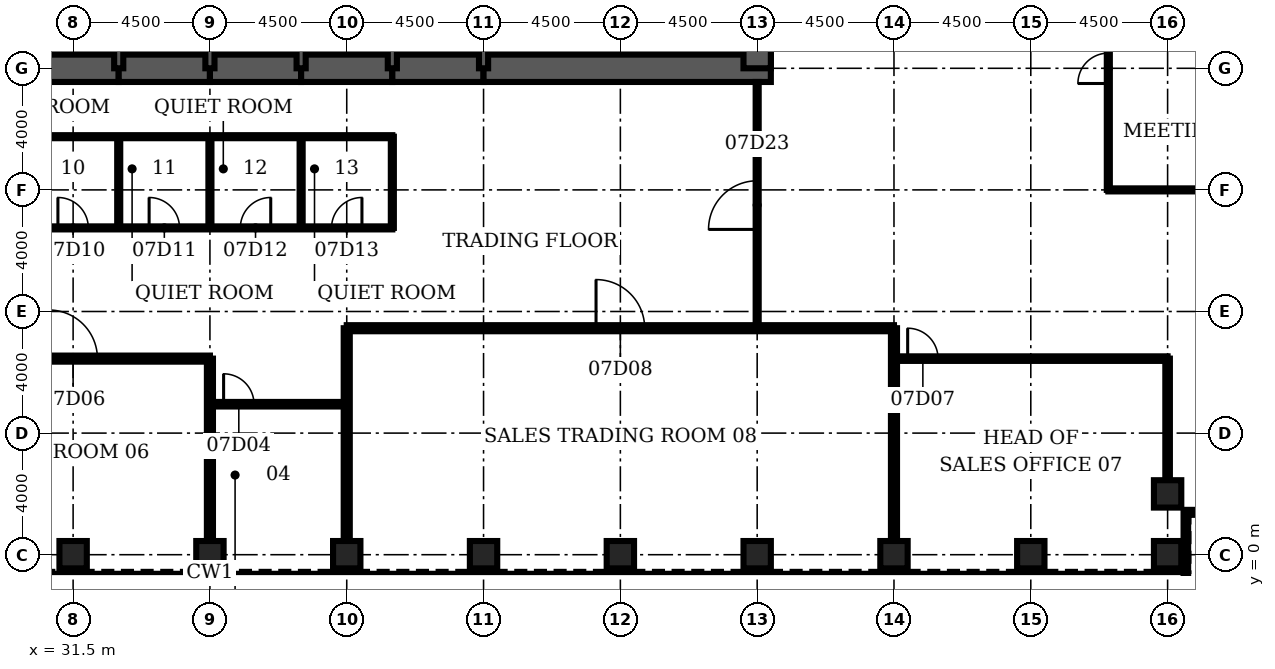
"""IFC4 building model, lengths in metres.
Left out: names, types, materials, properties, quantities, classifications, styles, units other than length and angle.
Written with IfcOpenShell. Run it as: python <this file> out.ifc"""

import sys

from ifc_helpers import new_model, si_unit, direction, frame, frame_2d, origin, origin_2d, place, context, subcontext, project, spatial, rectangle, hollow_rectangle, extrude, element, fill, save


model = new_model("IFC4")
c1 = context("Model", 3, precision=1e-05, world=origin(), true_north=direction((0.0, 1.0)))
c2 = subcontext(c1, "Body", "Model", "MODEL_VIEW")
j1 = project(units=[si_unit("LENGTHUNIT", "METRE"), si_unit("PLANEANGLEUNIT", "RADIAN")], contexts=[c1])
p1 = place(None, origin())
s1 = spatial("IfcSite", under=j1, at=p1, CompositionType="ELEMENT")
p2 = place(p1, origin())
s2 = spatial("IfcBuilding", under=s1, at=p2, CompositionType="ELEMENT")
p3 = place(p2, frame((0.0, 0.0, 36.5)))
s3 = spatial("IfcBuildingStorey", under=s2, at=p3, CompositionType="ELEMENT", Elevation=36.5)
for number, where, z_axis, x_axis in (
    (1, (31.5, 0.0, 0.0), (0.0, 0.0, 1.0), (0.0, 1.0, 0.0)),
    (2, (36.0, 0.0, 0.0), (0.0, 0.0, 1.0), (0.0, 1.0, 0.0)),
    (3, (40.5, 0.0, 0.0), (0.0, 0.0, 1.0), (0.0, 1.0, 0.0)),
    (4, (45.0, 0.0, 0.0), (0.0, 0.0, 1.0), (0.0, 1.0, 0.0)),
    (5, (49.5, 0.0, 0.0), (0.0, 0.0, 1.0), (0.0, 1.0, 0.0)),
    (6, (54.0, 0.0, 0.0), (0.0, 0.0, 1.0), (0.0, 1.0, 0.0)),
    (7, (58.5, 0.0, 0.0), (0.0, 0.0, 1.0), (0.0, 1.0, 0.0)),
    (8, (63.0, 0.0, 0.0), (0.0, 0.0, 1.0), (0.0, 1.0, 0.0)),
    (9, (67.5, 0.0, 0.0), (0.0, 0.0, 1.0), (0.0, 1.0, 0.0)),
    (10, (67.5, 2.0, 0.0), (0.0, 0.0, 1.0), (0.0, 1.0, 0.0)),
):
    element("IfcColumn", number, at=place(p3, frame(where, z_axis=z_axis, x_axis=x_axis)), inside=s3, PredefinedType="COLUMN", context=c2, shape_type="SweptSolid", body=[
        extrude(hollow_rectangle(XDim=0.9, YDim=0.9, WallThickness=0.12, at=origin_2d()), origin(), (0.0, 0.0, 1.0), 4.5),
    ])
for number, where, z_axis, x_axis in (
    (11, (30.0, 16.0, 0.0), (0.0, 0.0, 1.0), (1.0, 0.0, 0.0)),
    (12, (33.0, 16.0, 0.0), (0.0, 0.0, 1.0), (1.0, 0.0, 0.0)),
    (13, (36.0, 16.0, 0.0), (0.0, 0.0, 1.0), (1.0, 0.0, 0.0)),
    (14, (39.0, 16.0, 0.0), (0.0, 0.0, 1.0), (1.0, 0.0, 0.0)),
    (15, (42.0, 16.0, 0.0), (0.0, 0.0, 1.0), (1.0, 0.0, 0.0)),
):
    element("IfcWall", number, at=place(p3, frame(where, z_axis=z_axis, x_axis=x_axis)), inside=s3, PredefinedType="SHEAR", context=c2, shape_type="SweptSolid", body=[
        extrude(rectangle(XDim=3.0, YDim=0.9, at=frame_2d((1.5, 0.0))), origin(), (0.0, 0.0, 1.0), 4.5),
    ])
p4 = place(p3, frame((45.0, 16.0, 0.0), z_axis=(0.0, 0.0, 1.0), x_axis=(1.0, 0.0, 0.0)))
e16 = element("IfcWall", 16, at=p4, inside=s3, PredefinedType="SHEAR", context=c2, shape_type="SweptSolid", body=[
    extrude(rectangle(XDim=9.45, YDim=0.9, at=frame_2d((4.725, 0.0))), origin(), (0.0, 0.0, 1.0), 4.5),
])
p5 = place(p3, frame((54.0, 16.0, 0.0), z_axis=(0.0, 0.0, 1.0), x_axis=(0.0, 1.0, 0.0)))
e17 = element("IfcWall", 17, at=p5, inside=s3, PredefinedType="SHEAR", context=c2, shape_type="SweptSolid", body=[
    extrude(rectangle(XDim=3.2, YDim=0.9, at=frame_2d((1.6, 0.0))), origin(), (0.0, 0.0, 1.0), 4.5),
])
for number, where, z_axis, x_axis in (
    (18, (33.0, 16.0, 0.0), (0.0, 0.0, 1.0), (0.0, 1.0, 0.0)),
    (19, (36.0, 16.0, 0.0), (0.0, 0.0, 1.0), (0.0, 1.0, 0.0)),
    (20, (39.0, 16.0, 0.0), (0.0, 0.0, 1.0), (0.0, 1.0, 0.0)),
    (21, (42.0, 16.0, 0.0), (0.0, 0.0, 1.0), (0.0, 1.0, 0.0)),
    (22, (45.0, 16.0, 0.0), (0.0, 0.0, 1.0), (0.0, 1.0, 0.0)),
):
    element("IfcWall", number, at=place(p3, frame(where, z_axis=z_axis, x_axis=x_axis)), inside=s3, PredefinedType="SOLIDWALL", context=c2, shape_type="SweptSolid", body=[
        extrude(rectangle(XDim=3.2, YDim=0.3, at=frame_2d((1.6, 0.0))), origin(), (0.0, 0.0, 1.0), 4.5),
    ])
p6 = place(p3, frame((36.0, 4.95, 0.0), z_axis=(0.0, 0.0, 1.0), x_axis=(1.0, 0.0, 0.0)))
e23 = element("IfcWall", 23, at=p6, inside=s3, PredefinedType="PARTITIONING", context=c2, shape_type="SweptSolid", body=[
    extrude(rectangle(XDim=4.5, YDim=0.15, at=frame_2d((2.25, 0.0))), origin(), (0.0, 0.0, 1.0), 3.0),
])
p7 = place(p6, frame((0.45, 0.0, 0.0)))
e24 = element("IfcOpeningElement", 24, at=p7, cuts=e23, PredefinedType="OPENING", context=c2, shape_type="SweptSolid", body=[
    extrude(rectangle(XDim=1.0, YDim=2.1, at=frame_2d((0.5, 1.05))), frame((0.0, 0.085, 0.0), z_axis=(0.0, -1.0, 0.0), x_axis=(1.0, 0.0, 0.0)), (0.0, 0.0, 1.0), 0.17),
])
p8 = place(p3, frame((27.0, 6.45, 0.0), z_axis=(0.0, 0.0, 1.0), x_axis=(1.0, 0.0, 0.0)))
e25 = element("IfcWall", 25, at=p8, inside=s3, PredefinedType="PARTITIONING", context=c2, shape_type="SweptSolid", body=[
    extrude(rectangle(XDim=9.0, YDim=0.2, at=frame_2d((4.5, 0.0))), origin(), (0.0, 0.0, 1.0), 3.0),
])
p9 = place(p8, frame((3.7, 0.0, 0.0)))
e26 = element("IfcOpeningElement", 26, at=p9, cuts=e25, PredefinedType="OPENING", context=c2, shape_type="SweptSolid", body=[
    extrude(rectangle(XDim=1.6, YDim=2.1, at=frame_2d((0.8, 1.05))), frame((0.0, 0.11, 0.0), z_axis=(0.0, -1.0, 0.0), x_axis=(1.0, 0.0, 0.0)), (0.0, 0.0, 1.0), 0.22),
])
p10 = place(p3, frame((58.5, 6.45, 0.0), z_axis=(0.0, 0.0, 1.0), x_axis=(1.0, 0.0, 0.0)))
e27 = element("IfcWall", 27, at=p10, inside=s3, PredefinedType="PARTITIONING", context=c2, shape_type="SweptSolid", body=[
    extrude(rectangle(XDim=9.0, YDim=0.15, at=frame_2d((4.5, 0.0))), origin(), (0.0, 0.0, 1.0), 3.0),
])
p11 = place(p10, frame((0.45, 0.0, 0.0)))
e28 = element("IfcOpeningElement", 28, at=p11, cuts=e27, PredefinedType="OPENING", context=c2, shape_type="SweptSolid", body=[
    extrude(rectangle(XDim=1.0, YDim=2.1, at=frame_2d((0.5, 1.05))), frame((0.0, 0.085, 0.0), z_axis=(0.0, -1.0, 0.0), x_axis=(1.0, 0.0, 0.0)), (0.0, 0.0, 1.0), 0.17),
])
p12 = place(p3, frame((40.5, 7.45, 0.0), z_axis=(0.0, 0.0, 1.0), x_axis=(1.0, 0.0, 0.0)))
e29 = element("IfcWall", 29, at=p12, inside=s3, PredefinedType="PARTITIONING", context=c2, shape_type="SweptSolid", body=[
    extrude(rectangle(XDim=18.0, YDim=0.2, at=frame_2d((9.0, 0.0))), origin(), (0.0, 0.0, 1.0), 3.0),
])
p13 = place(p12, frame((8.2, 0.0, 0.0)))
e30 = element("IfcOpeningElement", 30, at=p13, cuts=e29, PredefinedType="OPENING", context=c2, shape_type="SweptSolid", body=[
    extrude(rectangle(XDim=1.6, YDim=2.1, at=frame_2d((0.8, 1.05))), frame((0.0, 0.11, 0.0), z_axis=(0.0, -1.0, 0.0), x_axis=(1.0, 0.0, 0.0)), (0.0, 0.0, 1.0), 0.22),
])
p14 = place(p3, frame((30.0, 10.75, 0.0), z_axis=(0.0, 0.0, 1.0), x_axis=(1.0, 0.0, 0.0)))
e31 = element("IfcWall", 31, at=p14, inside=s3, PredefinedType="PARTITIONING", context=c2, shape_type="SweptSolid", body=[
    extrude(rectangle(XDim=12.0, YDim=0.1, at=frame_2d((6.0, 0.0))), origin(), (0.0, 0.0, 1.0), 3.0),
])
p15 = place(p14, frame((1.0, 0.0, 0.0)))
e32 = element("IfcOpeningElement", 32, at=p15, cuts=e31, PredefinedType="OPENING", context=c2, shape_type="SweptSolid", body=[
    extrude(rectangle(XDim=1.0, YDim=2.1, at=frame_2d((0.5, 1.05))), frame((0.0, 0.06, 0.0), z_axis=(0.0, -1.0, 0.0), x_axis=(1.0, 0.0, 0.0)), (0.0, 0.0, 1.0), 0.12),
])
p16 = place(p14, frame((4.0, 0.0, 0.0)))
e33 = element("IfcOpeningElement", 33, at=p16, cuts=e31, PredefinedType="OPENING", context=c2, shape_type="SweptSolid", body=[
    extrude(rectangle(XDim=1.0, YDim=2.1, at=frame_2d((0.5, 1.05))), frame((0.0, 0.06, 0.0), z_axis=(0.0, -1.0, 0.0), x_axis=(1.0, 0.0, 0.0)), (0.0, 0.0, 1.0), 0.12),
])
p17 = place(p14, frame((7.0, 0.0, 0.0)))
e34 = element("IfcOpeningElement", 34, at=p17, cuts=e31, PredefinedType="OPENING", context=c2, shape_type="SweptSolid", body=[
    extrude(rectangle(XDim=1.0, YDim=2.1, at=frame_2d((0.5, 1.05))), frame((0.0, 0.06, 0.0), z_axis=(0.0, -1.0, 0.0), x_axis=(1.0, 0.0, 0.0)), (0.0, 0.0, 1.0), 0.12),
])
p18 = place(p14, frame((10.0, 0.0, 0.0)))
e35 = element("IfcOpeningElement", 35, at=p18, cuts=e31, PredefinedType="OPENING", context=c2, shape_type="SweptSolid", body=[
    extrude(rectangle(XDim=1.0, YDim=2.1, at=frame_2d((0.5, 1.05))), frame((0.0, 0.06, 0.0), z_axis=(0.0, -1.0, 0.0), x_axis=(1.0, 0.0, 0.0)), (0.0, 0.0, 1.0), 0.12),
])
p19 = place(p3, frame((65.55, 12.0, 0.0), z_axis=(0.0, 0.0, 1.0), x_axis=(1.0, 0.0, 0.0)))
e36 = element("IfcWall", 36, at=p19, inside=s3, PredefinedType="PARTITIONING", context=c2, shape_type="SweptSolid", body=[
    extrude(rectangle(XDim=6.0, YDim=0.1, at=frame_2d((3.0, 0.0))), origin(), (0.0, 0.0, 1.0), 3.0),
])
p20 = place(p3, frame((30.0, 13.75, 0.0), z_axis=(0.0, 0.0, 1.0), x_axis=(1.0, 0.0, 0.0)))
e37 = element("IfcWall", 37, at=p20, inside=s3, PredefinedType="PARTITIONING", context=c2, shape_type="SweptSolid", body=[
    extrude(rectangle(XDim=12.0, YDim=0.1, at=frame_2d((6.0, 0.0))), origin(), (0.0, 0.0, 1.0), 3.0),
])
p21 = place(p3, frame((33.0, 10.75, 0.0), z_axis=(0.0, 0.0, 1.0), x_axis=(0.0, 1.0, 0.0)))
e38 = element("IfcWall", 38, at=p21, inside=s3, PredefinedType="PARTITIONING", context=c2, shape_type="SweptSolid", body=[
    extrude(rectangle(XDim=3.0, YDim=0.1, at=frame_2d((1.5, 0.0))), origin(), (0.0, 0.0, 1.0), 3.0),
])
p22 = place(p3, frame((36.0, 0.45, 0.0), z_axis=(0.0, 0.0, 1.0), x_axis=(0.0, 1.0, 0.0)))
e39 = element("IfcWall", 39, at=p22, inside=s3, PredefinedType="PARTITIONING", context=c2, shape_type="SweptSolid", body=[
    extrude(rectangle(XDim=6.0, YDim=0.2, at=frame_2d((3.0, 0.0))), origin(), (0.0, 0.0, 1.0), 3.0),
])
for number, where, z_axis, x_axis in (
    (40, (36.0, 10.75, 0.0), (0.0, 0.0, 1.0), (0.0, 1.0, 0.0)),
    (41, (39.0, 10.75, 0.0), (0.0, 0.0, 1.0), (0.0, 1.0, 0.0)),
):
    element("IfcWall", number, at=place(p3, frame(where, z_axis=z_axis, x_axis=x_axis)), inside=s3, PredefinedType="PARTITIONING", context=c2, shape_type="SweptSolid", body=[
        extrude(rectangle(XDim=3.0, YDim=0.1, at=frame_2d((1.5, 0.0))), origin(), (0.0, 0.0, 1.0), 3.0),
    ])
p23 = place(p3, frame((40.5, 0.45, 0.0), z_axis=(0.0, 0.0, 1.0), x_axis=(0.0, 1.0, 0.0)))
e42 = element("IfcWall", 42, at=p23, inside=s3, PredefinedType="PARTITIONING", context=c2, shape_type="SweptSolid", body=[
    extrude(rectangle(XDim=7.0, YDim=0.2, at=frame_2d((3.5, 0.0))), origin(), (0.0, 0.0, 1.0), 3.0),
])
p24 = place(p3, frame((42.0, 10.75, 0.0), z_axis=(0.0, 0.0, 1.0), x_axis=(0.0, 1.0, 0.0)))
e43 = element("IfcWall", 43, at=p24, inside=s3, PredefinedType="PARTITIONING", context=c2, shape_type="SweptSolid", body=[
    extrude(rectangle(XDim=3.0, YDim=0.1, at=frame_2d((1.5, 0.0))), origin(), (0.0, 0.0, 1.0), 3.0),
])
p25 = place(p3, frame((54.0, 7.45, 0.0), z_axis=(0.0, 0.0, 1.0), x_axis=(0.0, 1.0, 0.0)))
e44 = element("IfcWall", 44, at=p25, inside=s3, PredefinedType="PARTITIONING", context=c2, shape_type="SweptSolid", body=[
    extrude(rectangle(XDim=8.1, YDim=0.1, at=frame_2d((4.05, 0.0))), origin(), (0.0, 0.0, 1.0), 3.0),
])
p26 = place(p25, frame((3.25, 0.0, 0.0)))
e45 = element("IfcOpeningElement", 45, at=p26, cuts=e44, PredefinedType="OPENING", context=c2, shape_type="SweptSolid", body=[
    extrude(rectangle(XDim=1.6, YDim=2.1, at=frame_2d((0.8, 1.05))), frame((0.0, 0.06, 0.0), z_axis=(0.0, -1.0, 0.0), x_axis=(1.0, 0.0, 0.0)), (0.0, 0.0, 1.0), 0.12),
])
p27 = place(p3, frame((58.5, 0.45, 0.0), z_axis=(0.0, 0.0, 1.0), x_axis=(0.0, 1.0, 0.0)))
e46 = element("IfcWall", 46, at=p27, inside=s3, PredefinedType="PARTITIONING", context=c2, shape_type="SweptSolid", body=[
    extrude(rectangle(XDim=7.0, YDim=0.2, at=frame_2d((3.5, 0.0))), origin(), (0.0, 0.0, 1.0), 3.0),
])
p28 = place(p3, frame((65.55, 12.0, 0.0), z_axis=(0.0, 0.0, 1.0), x_axis=(0.0, 1.0, 0.0)))
e47 = element("IfcWall", 47, at=p28, inside=s3, PredefinedType="PARTITIONING", context=c2, shape_type="SweptSolid", body=[
    extrude(rectangle(XDim=8.0, YDim=0.1, at=frame_2d((4.0, 0.0))), origin(), (0.0, 0.0, 1.0), 3.0),
])
p29 = place(p28, frame((3.5, 0.0, 0.0)))
e48 = element("IfcOpeningElement", 48, at=p29, cuts=e47, PredefinedType="OPENING", context=c2, shape_type="SweptSolid", body=[
    extrude(rectangle(XDim=1.0, YDim=2.1, at=frame_2d((0.5, 1.05))), frame((0.0, 0.06, 0.0), z_axis=(0.0, -1.0, 0.0), x_axis=(1.0, 0.0, 0.0)), (0.0, 0.0, 1.0), 0.12),
])
p30 = place(p3, frame((67.5, 2.45, 0.0), z_axis=(0.0, 0.0, 1.0), x_axis=(0.0, 1.0, 0.0)))
e49 = element("IfcWall", 49, at=p30, inside=s3, PredefinedType="PARTITIONING", context=c2, shape_type="SweptSolid", body=[
    extrude(rectangle(XDim=4.0, YDim=0.15, at=frame_2d((2.0, 0.0))), origin(), (0.0, 0.0, 1.0), 3.0),
])
p31 = place(p3, frame((68.1, -0.6, 0.0), z_axis=(0.0, 0.0, 1.0), x_axis=(0.0, 1.0, 0.0)))
e50 = element("IfcWall", 50, at=p31, inside=s3, PredefinedType="ELEMENTEDWALL", context=c2, shape_type="SweptSolid", body=[
    extrude(rectangle(XDim=2.0, YDim=0.15, at=frame_2d((1.0, 0.0))), origin(), (0.0, 0.0, 1.0), 4.32),
])
p32 = place(p3, frame((68.1, 1.4, 0.0), z_axis=(0.0, 0.0, 1.0), x_axis=(1.0, 0.0, 0.0)))
e51 = element("IfcWall", 51, at=p32, inside=s3, PredefinedType="ELEMENTEDWALL", context=c2, shape_type="SweptSolid", body=[
    extrude(rectangle(XDim=2.25, YDim=0.15, at=frame_2d((1.125, 0.0))), origin(), (0.0, 0.0, 1.0), 4.32),
])
p33 = place(p7, origin())
e52 = element("IfcDoor", 52, at=p33, inside=s3, OperationType="SINGLE_SWING_LEFT", PredefinedType="DOOR", context=c2, shape_type="SweptSolid", body=[
    extrude(rectangle(XDim=1.0, YDim=2.1, at=frame_2d((0.5, 1.05))), frame((0.0, 0.025, 0.0), z_axis=(0.0, -1.0, 0.0), x_axis=(1.0, 0.0, 0.0)), (0.0, 0.0, 1.0), 0.05),
])
fill(e24, e52)
p34 = place(p9, origin())
e53 = element("IfcDoor", 53, at=p34, inside=s3, OperationType="SINGLE_SWING_LEFT", PredefinedType="DOOR", context=c2, shape_type="SweptSolid", body=[
    extrude(rectangle(XDim=1.6, YDim=2.1, at=frame_2d((0.8, 1.05))), frame((0.0, 0.025, 0.0), z_axis=(0.0, -1.0, 0.0), x_axis=(1.0, 0.0, 0.0)), (0.0, 0.0, 1.0), 0.05),
])
fill(e26, e53)
p35 = place(p11, origin())
e54 = element("IfcDoor", 54, at=p35, inside=s3, OperationType="SINGLE_SWING_LEFT", PredefinedType="DOOR", context=c2, shape_type="SweptSolid", body=[
    extrude(rectangle(XDim=1.0, YDim=2.1, at=frame_2d((0.5, 1.05))), frame((0.0, 0.025, 0.0), z_axis=(0.0, -1.0, 0.0), x_axis=(1.0, 0.0, 0.0)), (0.0, 0.0, 1.0), 0.05),
])
fill(e28, e54)
p36 = place(p13, origin())
e55 = element("IfcDoor", 55, at=p36, inside=s3, OperationType="SINGLE_SWING_LEFT", PredefinedType="DOOR", context=c2, shape_type="SweptSolid", body=[
    extrude(rectangle(XDim=1.6, YDim=2.1, at=frame_2d((0.8, 1.05))), frame((0.0, 0.025, 0.0), z_axis=(0.0, -1.0, 0.0), x_axis=(1.0, 0.0, 0.0)), (0.0, 0.0, 1.0), 0.05),
])
fill(e30, e55)
p37 = place(p15, origin())
e56 = element("IfcDoor", 56, at=p37, inside=s3, OperationType="SINGLE_SWING_LEFT", PredefinedType="DOOR", context=c2, shape_type="SweptSolid", body=[
    extrude(rectangle(XDim=1.0, YDim=2.1, at=frame_2d((0.5, 1.05))), frame((0.0, 0.025, 0.0), z_axis=(0.0, -1.0, 0.0), x_axis=(1.0, 0.0, 0.0)), (0.0, 0.0, 1.0), 0.05),
])
fill(e32, e56)
p38 = place(p16, origin())
e57 = element("IfcDoor", 57, at=p38, inside=s3, OperationType="SINGLE_SWING_LEFT", PredefinedType="DOOR", context=c2, shape_type="SweptSolid", body=[
    extrude(rectangle(XDim=1.0, YDim=2.1, at=frame_2d((0.5, 1.05))), frame((0.0, 0.025, 0.0), z_axis=(0.0, -1.0, 0.0), x_axis=(1.0, 0.0, 0.0)), (0.0, 0.0, 1.0), 0.05),
])
fill(e33, e57)
p39 = place(p17, origin())
e58 = element("IfcDoor", 58, at=p39, inside=s3, OperationType="SINGLE_SWING_RIGHT", PredefinedType="DOOR", context=c2, shape_type="SweptSolid", body=[
    extrude(rectangle(XDim=1.0, YDim=2.1, at=frame_2d((0.5, 1.05))), frame((0.0, 0.025, 0.0), z_axis=(0.0, -1.0, 0.0), x_axis=(1.0, 0.0, 0.0)), (0.0, 0.0, 1.0), 0.05),
])
fill(e34, e58)
p40 = place(p18, origin())
e59 = element("IfcDoor", 59, at=p40, inside=s3, OperationType="SINGLE_SWING_RIGHT", PredefinedType="DOOR", context=c2, shape_type="SweptSolid", body=[
    extrude(rectangle(XDim=1.0, YDim=2.1, at=frame_2d((0.5, 1.05))), frame((0.0, 0.025, 0.0), z_axis=(0.0, -1.0, 0.0), x_axis=(1.0, 0.0, 0.0)), (0.0, 0.0, 1.0), 0.05),
])
fill(e35, e59)
p41 = place(p29, origin())
e60 = element("IfcDoor", 60, at=p41, inside=s3, OperationType="SINGLE_SWING_LEFT", PredefinedType="DOOR", context=c2, shape_type="SweptSolid", body=[
    extrude(rectangle(XDim=1.0, YDim=2.1, at=frame_2d((0.5, 1.05))), frame((0.0, 0.025, 0.0), z_axis=(0.0, -1.0, 0.0), x_axis=(1.0, 0.0, 0.0)), (0.0, 0.0, 1.0), 0.05),
])
fill(e48, e60)
p42 = place(p26, origin())
e61 = element("IfcDoor", 61, at=p42, inside=s3, OperationType="SINGLE_SWING_LEFT", PredefinedType="DOOR", context=c2, shape_type="SweptSolid", body=[
    extrude(rectangle(XDim=1.6, YDim=2.1, at=frame_2d((0.8, 1.05))), frame((0.0, 0.025, 0.0), z_axis=(0.0, -1.0, 0.0), x_axis=(1.0, 0.0, 0.0)), (0.0, 0.0, 1.0), 0.05),
])
fill(e45, e61)
save(model, sys.argv[1])
